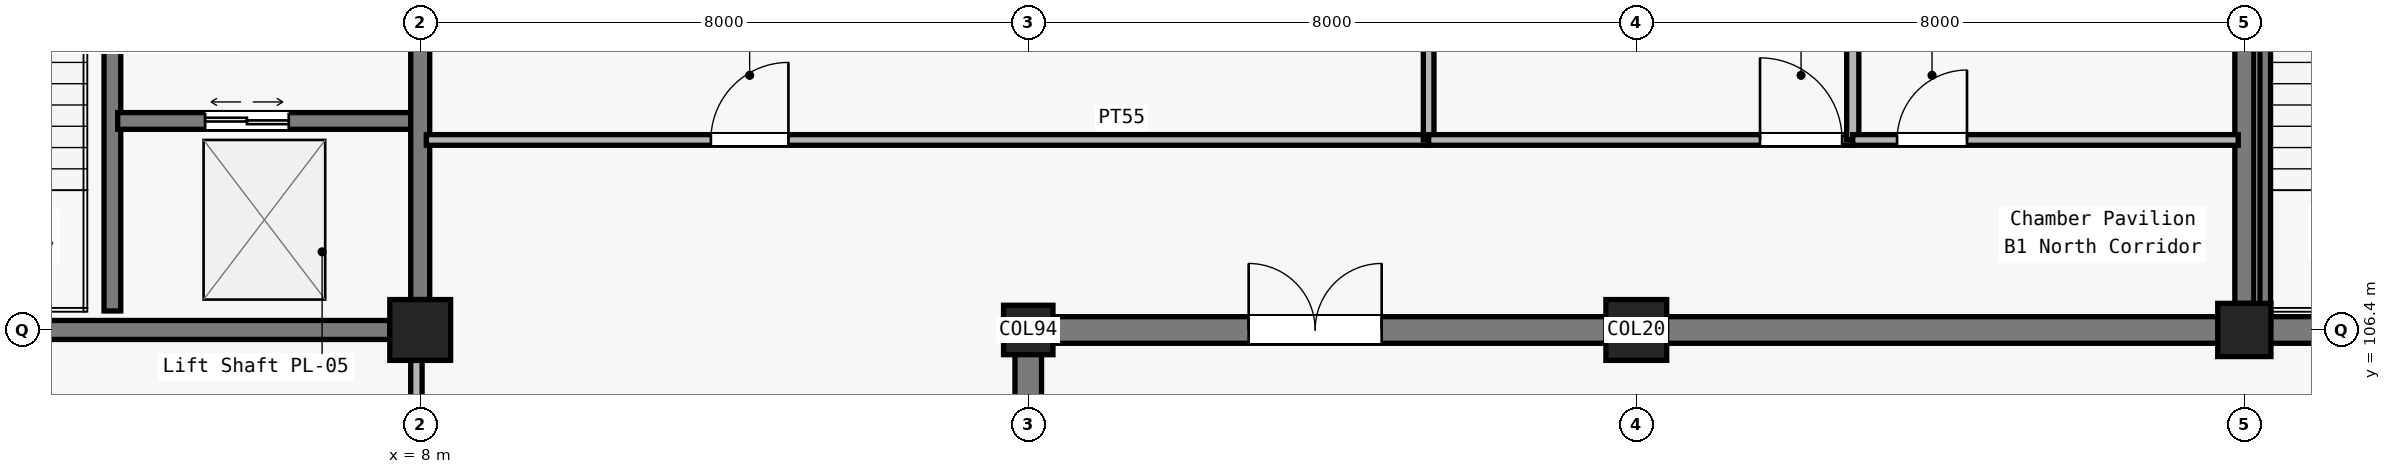
"""IFC4 building model, lengths in metres.
Left out: names, types, materials, properties, quantities, classifications, styles, units other than length and angle.
Written with IfcOpenShell. Run it as: python <this file> out.ifc"""

import sys

from ifc_helpers import new_model, si_unit, direction, frame, frame_2d, origin, origin_2d, place, context, subcontext, project, spatial, rectangle, circle, extrude, element, fill, save


model = new_model("IFC4")
c1 = context("Model", 3, precision=1e-05, world=origin(), true_north=direction((0.0, 1.0)))
c2 = subcontext(c1, "Body", "Model", "MODEL_VIEW")
j1 = project(units=[si_unit("LENGTHUNIT", "METRE"), si_unit("PLANEANGLEUNIT", "RADIAN")], contexts=[c1])
p1 = place(None, origin())
s1 = spatial("IfcSite", under=j1, at=p1, CompositionType="ELEMENT")
p2 = place(p1, origin())
s2 = spatial("IfcBuilding", under=s1, at=p2, CompositionType="ELEMENT")
p3 = place(p2, frame((0.0, 0.0, -5.4)))
s3 = spatial("IfcBuildingStorey", under=s2, at=p3, CompositionType="ELEMENT", Elevation=-5.4)
p4 = place(p3, frame((8.0, 106.4, 0.0), z_axis=(0.0, 0.0, 1.0), x_axis=(1.0, 0.0, 0.0)))
e1 = element("IfcColumn", 1, at=p4, inside=s3, PredefinedType="COLUMN", context=c2, shape_type="SweptSolid", body=[
    extrude(circle(Radius=0.4, at=origin_2d()), origin(), (0.0, 0.0, 1.0), 5.4),
])
p5 = place(p3, frame((16.0, 106.4, 0.0), z_axis=(0.0, 0.0, 1.0), x_axis=(1.0, 0.0, 0.0)))
e2 = element("IfcColumn", 2, at=p5, inside=s3, PredefinedType="COLUMN", context=c2, shape_type="SweptSolid", body=[
    extrude(circle(Radius=0.325, at=origin_2d()), origin(), (0.0, 0.0, 1.0), 5.4),
])
p6 = place(p3, frame((24.0, 106.4, 0.0), z_axis=(0.0, 0.0, 1.0), x_axis=(1.0, 0.0, 0.0)))
e3 = element("IfcColumn", 3, at=p6, inside=s3, PredefinedType="COLUMN", context=c2, shape_type="SweptSolid", body=[
    extrude(rectangle(XDim=0.8, YDim=0.8, at=origin_2d()), origin(), (0.0, 0.0, 1.0), 5.4),
])
p7 = place(p3, frame((32.0, 106.4, 0.0), z_axis=(0.0, 0.0, 1.0), x_axis=(1.0, 0.0, 0.0)))
e4 = element("IfcColumn", 4, at=p7, inside=s3, PredefinedType="COLUMN", context=c2, shape_type="SweptSolid", body=[
    extrude(rectangle(XDim=0.7, YDim=0.7, at=origin_2d()), origin(), (0.0, 0.0, 1.0), 5.4),
])
p8 = place(p3, frame((16.0, 106.4, 0.0), z_axis=(0.0, 0.0, 1.0), x_axis=(1.0, 0.0, 0.0)))
e5 = element("IfcWall", 5, at=p8, inside=s3, PredefinedType="SHEAR", context=c2, shape_type="SweptSolid", body=[
    extrude(rectangle(XDim=8.0, YDim=0.35, at=frame_2d((4.0, 0.0))), origin(), (0.0, 0.0, 1.0), 5.08),
])
p9 = place(p8, frame((2.9, 0.0, 0.0)))
e6 = element("IfcOpeningElement", 6, at=p9, cuts=e5, PredefinedType="OPENING", context=c2, shape_type="SweptSolid", body=[
    extrude(rectangle(XDim=1.75, YDim=2.25, at=frame_2d((0.875, 1.125))), frame((0.0, 0.185, 0.0), z_axis=(0.0, -1.0, 0.0), x_axis=(1.0, 0.0, 0.0)), (0.0, 0.0, 1.0), 0.37),
])
for number, where, z_axis, x_axis in (
    (7, (24.0, 106.4, 0.0), (0.0, 0.0, 1.0), (1.0, 0.0, 0.0)),
    (8, (32.0, 106.4, 0.0), (0.0, 0.0, 1.0), (1.0, 0.0, 0.0)),
):
    element("IfcWall", number, at=place(p3, frame(where, z_axis=z_axis, x_axis=x_axis)), inside=s3, PredefinedType="SHEAR", context=c2, shape_type="SweptSolid", body=[
        extrude(rectangle(XDim=8.0, YDim=0.35, at=frame_2d((4.0, 0.0))), origin(), (0.0, 0.0, 1.0), 5.08),
    ])
p10 = place(p3, frame((16.0, 98.8, 0.0), z_axis=(0.0, 0.0, 1.0), x_axis=(0.0, 1.0, 0.0)))
e9 = element("IfcWall", 9, at=p10, inside=s3, PredefinedType="SHEAR", context=c2, shape_type="SweptSolid", body=[
    extrude(rectangle(XDim=7.6, YDim=0.35, at=frame_2d((3.8, 0.0))), origin(), (0.0, 0.0, 1.0), 5.08),
])
p11 = place(p10, frame((2.9, 0.0, 0.0)))
e10 = element("IfcOpeningElement", 10, at=p11, cuts=e9, PredefinedType="OPENING", context=c2, shape_type="SweptSolid", body=[
    extrude(rectangle(XDim=1.75, YDim=2.25, at=frame_2d((0.875, 1.125))), frame((0.0, 0.185, 0.0), z_axis=(0.0, -1.0, 0.0), x_axis=(1.0, 0.0, 0.0)), (0.0, 0.0, 1.0), 0.37),
])
p12 = place(p3, frame((0.25, 106.4, 0.0), z_axis=(0.0, 0.0, 1.0), x_axis=(1.0, 0.0, 0.0)))
e11 = element("IfcWall", 11, at=p12, inside=s3, PredefinedType="SOLIDWALL", context=c2, shape_type="SweptSolid", body=[
    extrude(rectangle(XDim=7.35, YDim=0.25, at=frame_2d((3.675, 0.0))), origin(), (0.0, 0.0, 1.0), 4.255),
])
p13 = place(p3, frame((3.95, 106.65, 0.0), z_axis=(0.0, 0.0, 1.0), x_axis=(0.0, 1.0, 0.0)))
e12 = element("IfcWall", 12, at=p13, inside=s3, PredefinedType="SOLIDWALL", context=c2, shape_type="SweptSolid", body=[
    extrude(rectangle(XDim=7.1, YDim=0.22, at=frame_2d((3.55, 0.0))), origin(), (0.0, 0.0, 1.0), 5.08),
])
p14 = place(p13, frame((5.55, 0.0, 0.0)))
e13 = element("IfcOpeningElement", 13, at=p14, cuts=e12, PredefinedType="OPENING", context=c2, shape_type="SweptSolid", body=[
    extrude(rectangle(XDim=1.2, YDim=2.15, at=frame_2d((0.6, 1.075))), frame((0.0, 0.12, 0.0), z_axis=(0.0, -1.0, 0.0), x_axis=(1.0, 0.0, 0.0)), (0.0, 0.0, 1.0), 0.24),
])
p15 = place(p3, frame((4.02, 109.15, 0.0), z_axis=(0.0, 0.0, 1.0), x_axis=(1.0, 0.0, 0.0)))
e14 = element("IfcWall", 14, at=p15, inside=s3, PredefinedType="SOLIDWALL", context=c2, shape_type="SweptSolid", body=[
    extrude(rectangle(XDim=3.93, YDim=0.22, at=frame_2d((1.965, 0.0))), origin(), (0.0, 0.0, 1.0), 4.43),
])
p16 = place(p15, frame((1.15, 0.0, 0.0)))
e15 = element("IfcOpeningElement", 15, at=p16, cuts=e14, PredefinedType="OPENING", context=c2, shape_type="SweptSolid", body=[
    extrude(rectangle(XDim=1.1, YDim=2.2, at=frame_2d((0.55, 1.1))), frame((0.0, 0.12, 0.0), z_axis=(0.0, -1.0, 0.0), x_axis=(1.0, 0.0, 0.0)), (0.0, 0.0, 1.0), 0.24),
])
p17 = place(p3, frame((8.0, 106.8, 0.0), z_axis=(0.0, 0.0, 1.0), x_axis=(0.0, 1.0, 0.0)))
e16 = element("IfcWall", 16, at=p17, inside=s3, PredefinedType="SOLIDWALL", context=c2, shape_type="SweptSolid", body=[
    extrude(rectangle(XDim=6.875, YDim=0.25, at=frame_2d((3.438, 0.0))), origin(), (0.0, 0.0, 1.0), 4.255),
])
p18 = place(p17, frame((3.45, 0.0, 0.0)))
e17 = element("IfcOpeningElement", 17, at=p18, cuts=e16, PredefinedType="OPENING", context=c2, shape_type="SweptSolid", body=[
    extrude(rectangle(XDim=1.35, YDim=2.2, at=frame_2d((0.675, 1.1))), frame((0.0, 0.135, 0.0), z_axis=(0.0, -1.0, 0.0), x_axis=(1.0, 0.0, 0.0)), (0.0, 0.0, 1.0), 0.27),
])
p19 = place(p3, frame((32.0, 106.75, 0.0), z_axis=(0.0, 0.0, 1.0), x_axis=(0.0, 1.0, 0.0)))
e18 = element("IfcWall", 18, at=p19, inside=s3, PredefinedType="SOLIDWALL", context=c2, shape_type="SweptSolid", body=[
    extrude(rectangle(XDim=6.8, YDim=0.25, at=frame_2d((3.4, 0.0))), origin(), (0.0, 0.0, 1.0), 4.205),
])
p20 = place(p3, frame((8.08, 108.9, 0.0), z_axis=(0.0, 0.0, 1.0), x_axis=(1.0, 0.0, 0.0)))
e19 = element("IfcWall", 19, at=p20, inside=s3, PredefinedType="PARTITIONING", context=c2, shape_type="SweptSolid", body=[
    extrude(rectangle(XDim=13.188, YDim=0.14, at=frame_2d((6.594, 0.0))), origin(), (0.0, 0.0, 1.0), 4.405),
])
p21 = place(p20, frame((3.744, 0.0, 0.0)))
e20 = element("IfcOpeningElement", 20, at=p21, cuts=e19, PredefinedType="OPENING", context=c2, shape_type="SweptSolid", body=[
    extrude(rectangle(XDim=1.02, YDim=2.1, at=frame_2d((0.51, 1.05))), frame((0.0, 0.08, 0.0), z_axis=(0.0, -1.0, 0.0), x_axis=(1.0, 0.0, 0.0)), (0.0, 0.0, 1.0), 0.16),
])
p22 = place(p3, frame((21.268, 108.9, 0.0), z_axis=(0.0, 0.0, 1.0), x_axis=(0.0, 1.0, 0.0)))
e21 = element("IfcWall", 21, at=p22, inside=s3, PredefinedType="PARTITIONING", context=c2, shape_type="SweptSolid", body=[
    extrude(rectangle(XDim=5.02, YDim=0.14, at=frame_2d((2.51, 0.0))), origin(), (0.0, 0.0, 1.0), 4.475),
])
p23 = place(p3, frame((21.268, 108.9, 0.0), z_axis=(0.0, 0.0, 1.0), x_axis=(1.0, 0.0, 0.0)))
e22 = element("IfcWall", 22, at=p23, inside=s3, PredefinedType="PARTITIONING", context=c2, shape_type="SweptSolid", body=[
    extrude(rectangle(XDim=5.58, YDim=0.14, at=frame_2d((2.79, 0.0))), origin(), (0.0, 0.0, 1.0), 4.38),
])
p24 = place(p23, frame((4.36, 0.0, 0.0)))
e23 = element("IfcOpeningElement", 23, at=p24, cuts=e22, PredefinedType="OPENING", context=c2, shape_type="SweptSolid", body=[
    extrude(rectangle(XDim=1.08, YDim=2.1, at=frame_2d((0.54, 1.05))), frame((0.0, 0.08, 0.0), z_axis=(0.0, -1.0, 0.0), x_axis=(1.0, 0.0, 0.0)), (0.0, 0.0, 1.0), 0.16),
])
p25 = place(p3, frame((26.848, 108.9, 0.0), z_axis=(0.0, 0.0, 1.0), x_axis=(0.0, 1.0, 0.0)))
e24 = element("IfcWall", 24, at=p25, inside=s3, PredefinedType="PARTITIONING", context=c2, shape_type="SweptSolid", body=[
    extrude(rectangle(XDim=5.02, YDim=0.16, at=frame_2d((2.51, 0.0))), origin(), (0.0, 0.0, 1.0), 4.45),
])
p26 = place(p3, frame((26.848, 108.9, 0.0), z_axis=(0.0, 0.0, 1.0), x_axis=(1.0, 0.0, 0.0)))
e25 = element("IfcWall", 25, at=p26, inside=s3, PredefinedType="PARTITIONING", context=c2, shape_type="SweptSolid", body=[
    extrude(rectangle(XDim=5.072, YDim=0.14, at=frame_2d((2.536, 0.0))), origin(), (0.0, 0.0, 1.0), 4.455),
])
p27 = place(p26, frame((0.583, 0.0, 0.0)))
e26 = element("IfcOpeningElement", 26, at=p27, cuts=e25, PredefinedType="OPENING", context=c2, shape_type="SweptSolid", body=[
    extrude(rectangle(XDim=0.92, YDim=2.15, at=frame_2d((0.46, 1.075))), frame((0.0, 0.08, 0.0), z_axis=(0.0, -1.0, 0.0), x_axis=(1.0, 0.0, 0.0)), (0.0, 0.0, 1.0), 0.16),
])
p28 = place(p3, frame((7.95, 68.75, 0.0), z_axis=(0.0, 0.0, 1.0), x_axis=(0.0, 1.0, 0.0)))
e27 = element("IfcWall", 27, at=p28, inside=s3, PredefinedType="PARTITIONING", context=c2, shape_type="SweptSolid", body=[
    extrude(rectangle(XDim=37.25, YDim=0.15, at=frame_2d((18.625, 0.0))), origin(), (0.0, 0.0, 1.0), 4.155),
])
p29 = place(p28, frame((3.45, 0.0, 0.0)))
e28 = element("IfcOpeningElement", 28, at=p29, cuts=e27, PredefinedType="OPENING", context=c2, shape_type="SweptSolid", body=[
    extrude(rectangle(XDim=0.98, YDim=2.15, at=frame_2d((0.49, 1.075))), frame((0.0, 0.085, 0.0), z_axis=(0.0, -1.0, 0.0), x_axis=(1.0, 0.0, 0.0)), (0.0, 0.0, 1.0), 0.17),
])
p30 = place(p28, frame((26.25, 0.0, 0.0)))
e29 = element("IfcOpeningElement", 29, at=p30, cuts=e27, PredefinedType="OPENING", context=c2, shape_type="SweptSolid", body=[
    extrude(rectangle(XDim=1.01, YDim=2.15, at=frame_2d((0.505, 1.075))), frame((0.0, 0.085, 0.0), z_axis=(0.0, -1.0, 0.0), x_axis=(1.0, 0.0, 0.0)), (0.0, 0.0, 1.0), 0.17),
])
p31 = place(p3, frame((32.275, 106.55, 0.0), z_axis=(0.0, 0.0, 1.0), x_axis=(0.0, 1.0, 0.0)))
e30 = element("IfcWall", 30, at=p31, inside=s3, PredefinedType="SOLIDWALL", context=c2, shape_type="SweptSolid", body=[
    extrude(rectangle(XDim=7.3, YDim=0.14, at=frame_2d((3.65, 0.0))), origin(), (0.0, 0.0, 1.0), 5.08),
])
p32 = place(p16, origin())
e31 = element("IfcDoor", 31, at=p32, inside=s3, OperationType="DOUBLE_DOOR_SLIDING", PredefinedType="DOOR", context=c2, shape_type="SweptSolid", body=[
    extrude(rectangle(XDim=1.1, YDim=2.2, at=frame_2d((0.55, 1.1))), frame((0.0, 0.025, 0.0), z_axis=(0.0, -1.0, 0.0), x_axis=(1.0, 0.0, 0.0)), (0.0, 0.0, 1.0), 0.05),
])
fill(e15, e31)
p33 = place(p21, origin())
e32 = element("IfcDoor", 32, at=p33, inside=s3, OperationType="SINGLE_SWING_RIGHT", PredefinedType="DOOR", context=c2, shape_type="SweptSolid", body=[
    extrude(rectangle(XDim=1.02, YDim=2.1, at=frame_2d((0.51, 1.05))), frame((0.0, 0.025, 0.0), z_axis=(0.0, -1.0, 0.0), x_axis=(1.0, 0.0, 0.0)), (0.0, 0.0, 1.0), 0.05),
])
fill(e20, e32)
p34 = place(p24, origin())
e33 = element("IfcDoor", 33, at=p34, inside=s3, OperationType="SINGLE_SWING_LEFT", PredefinedType="DOOR", context=c2, shape_type="SweptSolid", body=[
    extrude(rectangle(XDim=1.08, YDim=2.1, at=frame_2d((0.54, 1.05))), frame((0.0, 0.025, 0.0), z_axis=(0.0, -1.0, 0.0), x_axis=(1.0, 0.0, 0.0)), (0.0, 0.0, 1.0), 0.05),
])
fill(e23, e33)
p35 = place(p27, origin())
e34 = element("IfcDoor", 34, at=p35, inside=s3, OperationType="SINGLE_SWING_RIGHT", PredefinedType="DOOR", context=c2, shape_type="SweptSolid", body=[
    extrude(rectangle(XDim=0.92, YDim=2.15, at=frame_2d((0.46, 1.075))), frame((0.0, 0.025, 0.0), z_axis=(0.0, -1.0, 0.0), x_axis=(1.0, 0.0, 0.0)), (0.0, 0.0, 1.0), 0.05),
])
fill(e26, e34)
p36 = place(p9, origin())
e35 = element("IfcDoor", 35, at=p36, inside=s3, OperationType="DOUBLE_DOOR_SINGLE_SWING", PredefinedType="DOOR", context=c2, shape_type="SweptSolid", body=[
    extrude(rectangle(XDim=1.75, YDim=2.25, at=frame_2d((0.875, 1.125))), frame((0.0, 0.025, 0.0), z_axis=(0.0, -1.0, 0.0), x_axis=(1.0, 0.0, 0.0)), (0.0, 0.0, 1.0), 0.05),
])
fill(e6, e35)
save(model, sys.argv[1])
